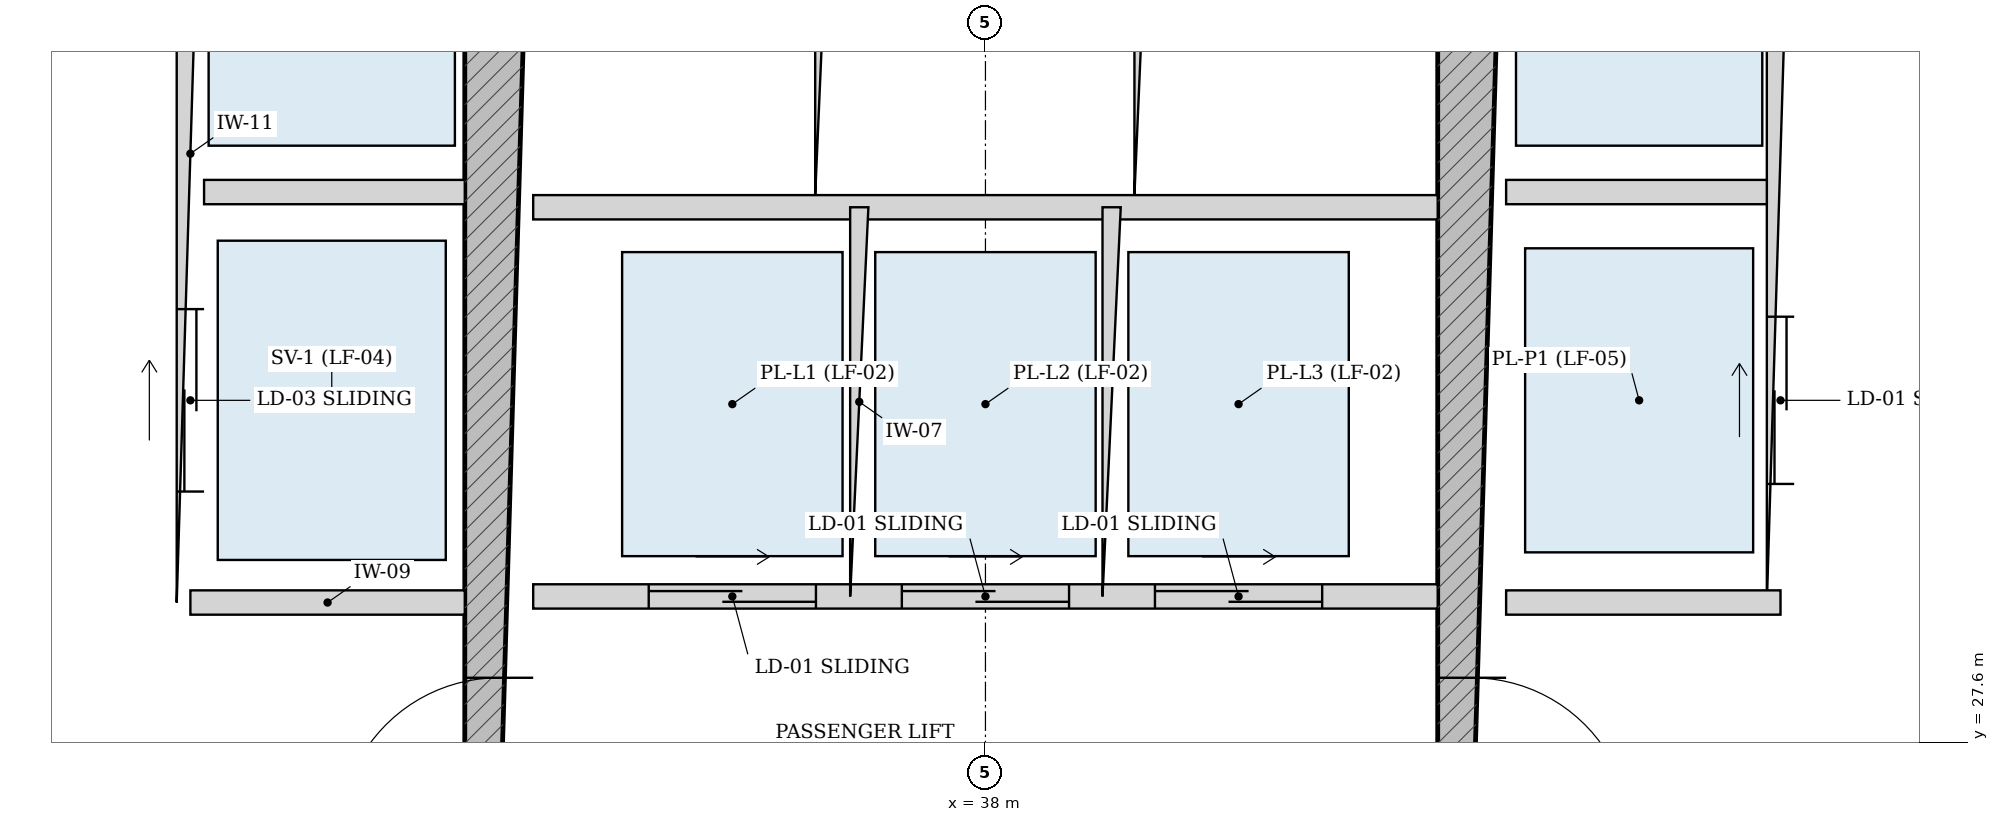
"""IFC4 building model, lengths in metres.
Left out: names, types, materials, properties, quantities, classifications, styles, units other than length and angle.
Written with IfcOpenShell. Run it as: python <this file> out.ifc"""

import sys

from ifc_helpers import new_model, si_unit, direction, frame, frame_2d, origin, place, context, subcontext, project, spatial, rectangle, extrude, source, transform, mapped, element, fill, save


model = new_model("IFC4")
c1 = context("Model", 3, precision=1e-05, world=origin(), true_north=direction((-0.2419218956, 0.970295726276)))
c2 = subcontext(c1, "Body", "Model", "MODEL_VIEW")
j1 = project(units=[si_unit("LENGTHUNIT", "METRE"), si_unit("PLANEANGLEUNIT", "RADIAN")], contexts=[c1])
p1 = place(None, origin())
s1 = spatial("IfcSite", under=j1, at=p1, CompositionType="ELEMENT")
p2 = place(p1, origin())
s2 = spatial("IfcBuilding", under=s1, at=p2, CompositionType="ELEMENT")
p3 = place(p2, origin())
s3 = spatial("IfcBuildingStorey", under=s2, at=p3, CompositionType="ELEMENT", Elevation=0.0)
p4 = place(p3, frame((34.8, 19.175, 0.0), z_axis=(0.0, 0.0, 1.0), x_axis=(0.0, 1.0, 0.0)))
e1 = element("IfcWall", 1, at=p4, inside=s3, PredefinedType="SHEAR", context=c2, shape_type="SweptSolid", body=[
    extrude(rectangle(XDim=15.25, YDim=0.45, at=frame_2d((7.625, 0.0))), origin(), (0.0, 0.0, 1.0), 5.1),
])
p5 = place(p4, frame((7.8, 0.0, 0.0)))
e2 = element("IfcOpeningElement", 2, at=p5, cuts=e1, PredefinedType="OPENING", context=c2, shape_type="SweptSolid", body=[
    extrude(rectangle(XDim=1.05, YDim=2.15, at=frame_2d((0.525, 1.075))), frame((0.0, 0.235, 0.0), z_axis=(0.0, -1.0, 0.0), x_axis=(1.0, 0.0, 0.0)), (0.0, 0.0, 1.0), 0.47),
])
p6 = place(p3, frame((41.2, 19.175, 0.0), z_axis=(0.0, 0.0, 1.0), x_axis=(0.0, 1.0, 0.0)))
e3 = element("IfcWall", 3, at=p6, inside=s3, PredefinedType="SHEAR", context=c2, shape_type="SweptSolid", body=[
    extrude(rectangle(XDim=15.25, YDim=0.45, at=frame_2d((7.625, 0.0))), origin(), (0.0, 0.0, 1.0), 5.1),
])
p7 = place(p6, frame((7.8, 0.0, 0.0)))
e4 = element("IfcOpeningElement", 4, at=p7, cuts=e3, PredefinedType="OPENING", context=c2, shape_type="SweptSolid", body=[
    extrude(rectangle(XDim=1.05, YDim=2.15, at=frame_2d((0.525, 1.075))), frame((0.0, 0.235, 0.0), z_axis=(0.0, -1.0, 0.0), x_axis=(1.0, 0.0, 0.0)), (0.0, 0.0, 1.0), 0.47),
])
p8 = place(p3, frame((32.77, 28.52, 0.0), z_axis=(0.0, 0.0, 1.0), x_axis=(0.0, 1.0, 0.0)))
e5 = element("IfcWall", 5, at=p8, inside=s3, PredefinedType="PARTITIONING", context=c2, shape_type="SweptSolid", body=[
    extrude(rectangle(XDim=5.905, YDim=0.18, at=frame_2d((2.953, 0.0))), origin(), (0.0, 0.0, 1.0), 5.1),
])
p9 = place(p8, frame((3.655, 0.0, 0.0)))
e6 = element("IfcOpeningElement", 6, at=p9, cuts=e5, PredefinedType="OPENING", context=c2, shape_type="SweptSolid", body=[
    extrude(rectangle(XDim=1.15, YDim=2.2, at=frame_2d((0.575, 1.1))), frame((0.0, 0.1, 0.0), z_axis=(0.0, -1.0, 0.0), x_axis=(1.0, 0.0, 0.0)), (0.0, 0.0, 1.0), 0.2),
])
p10 = place(p8, frame((0.73, 0.0, 0.0)))
e7 = element("IfcOpeningElement", 7, at=p10, cuts=e5, PredefinedType="OPENING", context=c2, shape_type="SweptSolid", body=[
    extrude(rectangle(XDim=1.2, YDim=2.25, at=frame_2d((0.6, 1.125))), frame((0.0, 0.1, 0.0), z_axis=(0.0, -1.0, 0.0), x_axis=(1.0, 0.0, 0.0)), (0.0, 0.0, 1.0), 0.2),
])
p11 = place(p3, frame((32.86, 31.22, 0.0), z_axis=(0.0, 0.0, 1.0), x_axis=(1.0, 0.0, 0.0)))
e8 = element("IfcWall", 8, at=p11, inside=s3, PredefinedType="PARTITIONING", context=c2, shape_type="SweptSolid", body=[
    extrude(rectangle(XDim=1.715, YDim=0.16, at=frame_2d((0.857, 0.0))), origin(), (0.0, 0.0, 1.0), 5.1),
])
p12 = place(p3, frame((32.77, 28.52, 0.0), z_axis=(0.0, 0.0, 1.0), x_axis=(1.0, 0.0, 0.0)))
e9 = element("IfcWall", 9, at=p12, inside=s3, PredefinedType="PARTITIONING", context=c2, shape_type="SweptSolid", body=[
    extrude(rectangle(XDim=1.805, YDim=0.16, at=frame_2d((0.902, 0.0))), origin(), (0.0, 0.0, 1.0), 5.1),
])
p13 = place(p3, frame((43.23, 28.52, 0.0), z_axis=(0.0, 0.0, 1.0), x_axis=(0.0, 1.0, 0.0)))
e10 = element("IfcWall", 10, at=p13, inside=s3, PredefinedType="PARTITIONING", context=c2, shape_type="SweptSolid", body=[
    extrude(rectangle(XDim=5.905, YDim=0.18, at=frame_2d((2.953, 0.0))), origin(), (0.0, 0.0, 1.0), 5.1),
])
p14 = place(p13, frame((3.655, 0.0, 0.0)))
e11 = element("IfcOpeningElement", 11, at=p14, cuts=e10, PredefinedType="OPENING", context=c2, shape_type="SweptSolid", body=[
    extrude(rectangle(XDim=1.15, YDim=2.2, at=frame_2d((0.575, 1.1))), frame((0.0, 0.1, 0.0), z_axis=(0.0, -1.0, 0.0), x_axis=(1.0, 0.0, 0.0)), (0.0, 0.0, 1.0), 0.2),
])
p15 = place(p13, frame((0.78, 0.0, 0.0)))
e12 = element("IfcOpeningElement", 12, at=p15, cuts=e10, PredefinedType="OPENING", context=c2, shape_type="SweptSolid", body=[
    extrude(rectangle(XDim=1.1, YDim=2.2, at=frame_2d((0.55, 1.1))), frame((0.0, 0.1, 0.0), z_axis=(0.0, -1.0, 0.0), x_axis=(1.0, 0.0, 0.0)), (0.0, 0.0, 1.0), 0.2),
])
p16 = place(p3, frame((41.425, 31.22, 0.0), z_axis=(0.0, 0.0, 1.0), x_axis=(1.0, 0.0, 0.0)))
e13 = element("IfcWall", 13, at=p16, inside=s3, PredefinedType="PARTITIONING", context=c2, shape_type="SweptSolid", body=[
    extrude(rectangle(XDim=1.715, YDim=0.16, at=frame_2d((0.857, 0.0))), origin(), (0.0, 0.0, 1.0), 5.1),
])
p17 = place(p3, frame((41.425, 28.52, 0.0), z_axis=(0.0, 0.0, 1.0), x_axis=(1.0, 0.0, 0.0)))
e14 = element("IfcWall", 14, at=p17, inside=s3, PredefinedType="PARTITIONING", context=c2, shape_type="SweptSolid", body=[
    extrude(rectangle(XDim=1.805, YDim=0.16, at=frame_2d((0.902, 0.0))), origin(), (0.0, 0.0, 1.0), 5.1),
])
p18 = place(p3, frame((35.025, 28.56, 0.0), z_axis=(0.0, 0.0, 1.0), x_axis=(1.0, 0.0, 0.0)))
e15 = element("IfcWall", 15, at=p18, inside=s3, PredefinedType="PARTITIONING", context=c2, shape_type="SweptSolid", body=[
    extrude(rectangle(XDim=5.95, YDim=0.16, at=frame_2d((2.975, 0.0))), origin(), (0.0, 0.0, 1.0), 5.1),
])
p19 = place(p18, frame((0.76, 0.0, 0.0)))
e16 = element("IfcOpeningElement", 16, at=p19, cuts=e15, PredefinedType="OPENING", context=c2, shape_type="SweptSolid", body=[
    extrude(rectangle(XDim=1.1, YDim=2.2, at=frame_2d((0.55, 1.1))), frame((0.0, 0.09, 0.0), z_axis=(0.0, -1.0, 0.0), x_axis=(1.0, 0.0, 0.0)), (0.0, 0.0, 1.0), 0.18),
])
p20 = place(p18, frame((2.425, 0.0, 0.0)))
e17 = element("IfcOpeningElement", 17, at=p20, cuts=e15, PredefinedType="OPENING", context=c2, shape_type="SweptSolid", body=[
    extrude(rectangle(XDim=1.1, YDim=2.2, at=frame_2d((0.55, 1.1))), frame((0.0, 0.09, 0.0), z_axis=(0.0, -1.0, 0.0), x_axis=(1.0, 0.0, 0.0)), (0.0, 0.0, 1.0), 0.18),
])
p21 = place(p18, frame((4.09, 0.0, 0.0)))
e18 = element("IfcOpeningElement", 18, at=p21, cuts=e15, PredefinedType="OPENING", context=c2, shape_type="SweptSolid", body=[
    extrude(rectangle(XDim=1.1, YDim=2.2, at=frame_2d((0.55, 1.1))), frame((0.0, 0.09, 0.0), z_axis=(0.0, -1.0, 0.0), x_axis=(1.0, 0.0, 0.0)), (0.0, 0.0, 1.0), 0.18),
])
p22 = place(p3, frame((35.025, 31.12, 0.0), z_axis=(0.0, 0.0, 1.0), x_axis=(1.0, 0.0, 0.0)))
e19 = element("IfcWall", 19, at=p22, inside=s3, PredefinedType="PARTITIONING", context=c2, shape_type="SweptSolid", body=[
    extrude(rectangle(XDim=5.95, YDim=0.16, at=frame_2d((2.975, 0.0))), origin(), (0.0, 0.0, 1.0), 5.1),
])
for number, where, z_axis, x_axis in (
    (20, (37.17, 28.56, 0.0), (0.0, 0.0, 1.0), (0.0, 1.0, 0.0)),
    (21, (38.83, 28.56, 0.0), (0.0, 0.0, 1.0), (0.0, 1.0, 0.0)),
):
    element("IfcWall", number, at=place(p3, frame(where, z_axis=z_axis, x_axis=x_axis)), inside=s3, PredefinedType="PARTITIONING", context=c2, shape_type="SweptSolid", body=[
        extrude(rectangle(XDim=2.56, YDim=0.12, at=frame_2d((1.28, 0.0))), origin(), (0.0, 0.0, 1.0), 5.1),
    ])
for number, where, z_axis, x_axis in (
    (22, (36.95, 31.2, 0.0), (0.0, 0.0, 1.0), (0.0, 1.0, 0.0)),
    (23, (39.05, 31.2, 0.0), (0.0, 0.0, 1.0), (0.0, 1.0, 0.0)),
):
    element("IfcWall", number, at=place(p3, frame(where, z_axis=z_axis, x_axis=x_axis)), inside=s3, PredefinedType="PARTITIONING", context=c2, shape_type="SweptSolid", body=[
        extrude(rectangle(XDim=3.225, YDim=0.14, at=frame_2d((1.613, 0.0))), origin(), (0.0, 0.0, 1.0), 5.1),
    ])
m1 = source(origin(), c2, "Body", "SweptSolid", [
    extrude(rectangle(XDim=1.05, YDim=2.15, at=frame_2d((0.525, 1.075))), frame((0.0, 0.025, 0.0), z_axis=(0.0, -1.0, 0.0), x_axis=(1.0, 0.0, 0.0)), (0.0, 0.0, 1.0), 0.05),
])
p23 = place(p5, origin())
e24 = element("IfcDoor", 24, at=p23, inside=s3, OperationType="SINGLE_SWING_LEFT", PredefinedType="DOOR", context=c2, shape_type="MappedRepresentation", body=[
    mapped(m1, transform((0.0, 0.0, 0.0), scale=1.0)),
])
fill(e2, e24)
p24 = place(p7, frame((1.05, 0.0, 0.0), z_axis=(0.0, 0.0, 1.0), x_axis=(-1.0, 0.0, 0.0)))
e25 = element("IfcDoor", 25, at=p24, inside=s3, OperationType="SINGLE_SWING_RIGHT", PredefinedType="DOOR", context=c2, shape_type="MappedRepresentation", body=[
    mapped(m1, transform((0.0, 0.0, 0.0), scale=1.0)),
])
fill(e4, e25)
m2 = source(origin(), c2, "Body", "SweptSolid", [
    extrude(rectangle(XDim=1.2, YDim=2.25, at=frame_2d((0.6, 1.125))), frame((0.0, 0.025, 0.0), z_axis=(0.0, -1.0, 0.0), x_axis=(1.0, 0.0, 0.0)), (0.0, 0.0, 1.0), 0.05),
])
p25 = place(p10, origin())
e26 = element("IfcDoor", 26, at=p25, inside=s3, OperationType="DOUBLE_DOOR_SLIDING", PredefinedType="DOOR", context=c2, shape_type="MappedRepresentation", body=[
    mapped(m2, transform((0.0, 0.0, 0.0), scale=1.0)),
])
fill(e7, e26)
m3 = source(origin(), c2, "Body", "SweptSolid", [
    extrude(rectangle(XDim=1.1, YDim=2.2, at=frame_2d((0.55, 1.1))), frame((0.0, 0.025, 0.0), z_axis=(0.0, -1.0, 0.0), x_axis=(1.0, 0.0, 0.0)), (0.0, 0.0, 1.0), 0.05),
])
p26 = place(p15, origin())
e27 = element("IfcDoor", 27, at=p26, inside=s3, OperationType="DOUBLE_DOOR_SLIDING", PredefinedType="DOOR", context=c2, shape_type="MappedRepresentation", body=[
    mapped(m3, transform((0.0, 0.0, 0.0), scale=1.0)),
])
fill(e12, e27)
p27 = place(p19, origin())
e28 = element("IfcDoor", 28, at=p27, inside=s3, OperationType="DOUBLE_DOOR_SLIDING", PredefinedType="DOOR", context=c2, shape_type="MappedRepresentation", body=[
    mapped(m3, transform((0.0, 0.0, 0.0), scale=1.0)),
])
fill(e16, e28)
p28 = place(p20, origin())
e29 = element("IfcDoor", 29, at=p28, inside=s3, OperationType="DOUBLE_DOOR_SLIDING", PredefinedType="DOOR", context=c2, shape_type="MappedRepresentation", body=[
    mapped(m3, transform((0.0, 0.0, 0.0), scale=1.0)),
])
fill(e17, e29)
p29 = place(p21, origin())
e30 = element("IfcDoor", 30, at=p29, inside=s3, OperationType="DOUBLE_DOOR_SLIDING", PredefinedType="DOOR", context=c2, shape_type="MappedRepresentation", body=[
    mapped(m3, transform((0.0, 0.0, 0.0), scale=1.0)),
])
fill(e18, e30)
save(model, sys.argv[1])
